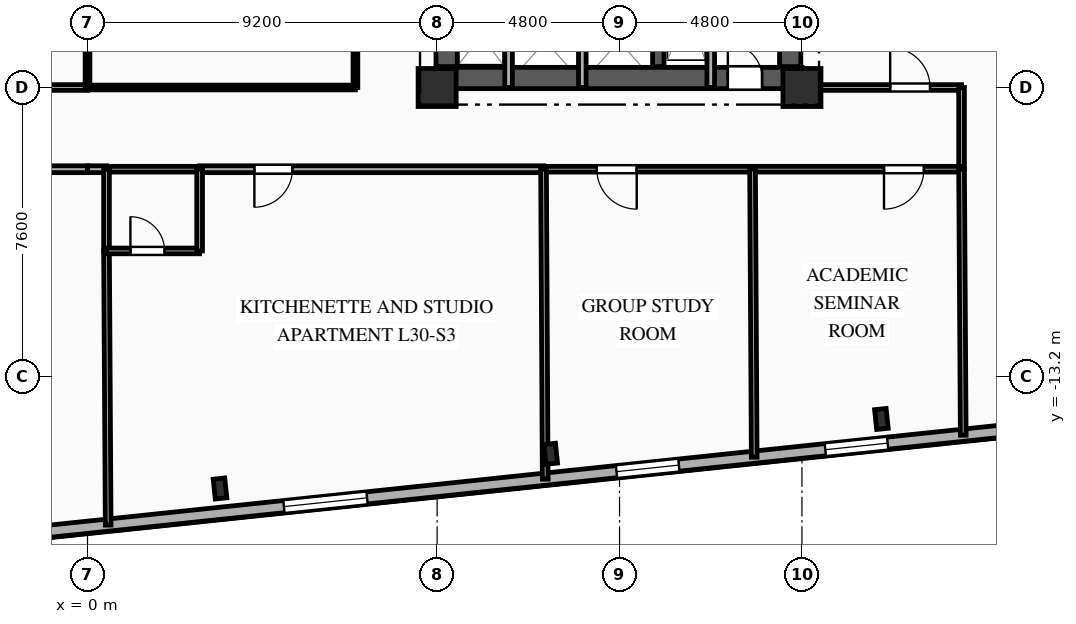
"""IFC4 building model, lengths in metres.
Left out: names, types, materials, properties, quantities, classifications, styles, units other than length and angle.
Written with IfcOpenShell. Run it as: python <this file> out.ifc"""

import sys

from ifc_helpers import new_model, si_unit, direction, frame, frame_2d, origin, origin_2d, place, context, subcontext, project, spatial, rectangle, i_section, extrude, element, fill, save


model = new_model("IFC4")
c1 = context("Model", 3, precision=1e-05, world=origin(), true_north=direction((0.0, 1.0)))
c2 = subcontext(c1, "Body", "Model", "MODEL_VIEW")
j1 = project(units=[si_unit("LENGTHUNIT", "METRE"), si_unit("PLANEANGLEUNIT", "RADIAN")], contexts=[c1])
p1 = place(None, origin())
s1 = spatial("IfcSite", under=j1, at=p1, CompositionType="ELEMENT")
p2 = place(p1, origin())
s2 = spatial("IfcBuilding", under=s1, at=p2, CompositionType="ELEMENT")
p3 = place(p2, frame((0.0, 0.0, 109.15)))
s3 = spatial("IfcBuildingStorey", under=s2, at=p3, CompositionType="ELEMENT", Elevation=109.15)
for number, where, z_axis, x_axis in (
    (1, (9.2, -5.6, 0.0), (0.0, 0.0, 1.0), (1.0, 0.0, 0.0)),
    (2, (18.8, -5.6, 0.0), (0.0, 0.0, 1.0), (1.0, 0.0, 0.0)),
):
    element("IfcColumn", number, at=place(p3, frame(where, z_axis=z_axis, x_axis=x_axis)), inside=s3, PredefinedType="COLUMN", context=c2, shape_type="SweptSolid", body=[
        extrude(rectangle(XDim=1.0, YDim=1.0, at=origin_2d()), origin(), (0.0, 0.0, 1.0), 3.35),
    ])
for number, where, z_axis, x_axis in (
    (3, (3.487, -16.151, 0.0), (0.0, 0.0, 1.0), (0.995, 0.105, 0.0)),
    (4, (12.189, -15.237, 0.0), (0.0, 0.0, 1.0), (0.995, 0.105, 0.0)),
    (5, (20.891, -14.322, 0.0), (0.0, 0.0, 1.0), (0.995, 0.105, 0.0)),
):
    element("IfcColumn", number, at=place(p3, frame(where, z_axis=z_axis, x_axis=x_axis)), inside=s3, PredefinedType="COLUMN", context=c2, shape_type="SweptSolid", body=[
        extrude(i_section(OverallWidth=0.306, OverallDepth=0.524, WebThickness=0.021, FlangeThickness=0.04, FilletRadius=0.027, at=origin_2d()), origin(), (0.0, 0.0, 1.0), 3.35),
    ])
p4 = place(p3, frame((30.307, -13.986, 0.0), z_axis=(0.0, 0.0, 1.0), x_axis=(-0.994521628355, -0.104531003701, 0.0)))
e6 = element("IfcWall", 6, at=p4, inside=s3, PredefinedType="SOLIDWALL", context=c2, shape_type="SweptSolid", body=[
    extrude(rectangle(XDim=53.8, YDim=0.32, at=frame_2d((26.9, 0.0))), origin(), (0.0, 0.0, 1.0), 3.045),
])
p5 = place(p4, frame((3.098, 0.0, 0.85)))
e7 = element("IfcOpeningElement", 7, at=p5, cuts=e6, PredefinedType="OPENING", context=c2, shape_type="SweptSolid", body=[
    extrude(rectangle(XDim=1.65, YDim=1.85, at=frame_2d((0.825, 0.925))), frame((0.0, 0.17, 0.0), z_axis=(0.0, -1.0, 0.0), x_axis=(1.0, 0.0, 0.0)), (0.0, 0.0, 1.0), 0.34),
])
p6 = place(p4, frame((9.302, 0.0, 0.85)))
e8 = element("IfcOpeningElement", 8, at=p6, cuts=e6, PredefinedType="OPENING", context=c2, shape_type="SweptSolid", body=[
    extrude(rectangle(XDim=1.65, YDim=1.85, at=frame_2d((0.825, 0.925))), frame((0.0, 0.17, 0.0), z_axis=(0.0, -1.0, 0.0), x_axis=(1.0, 0.0, 0.0)), (0.0, 0.0, 1.0), 0.34),
])
p7 = place(p4, frame((14.827, 0.0, 0.85)))
e9 = element("IfcOpeningElement", 9, at=p7, cuts=e6, PredefinedType="OPENING", context=c2, shape_type="SweptSolid", body=[
    extrude(rectangle(XDim=1.65, YDim=1.85, at=frame_2d((0.825, 0.925))), frame((0.0, 0.17, 0.0), z_axis=(0.0, -1.0, 0.0), x_axis=(1.0, 0.0, 0.0)), (0.0, 0.0, 1.0), 0.34),
])
p8 = place(p4, frame((23.078, 0.0, 0.85)))
e10 = element("IfcOpeningElement", 10, at=p8, cuts=e6, PredefinedType="OPENING", context=c2, shape_type="SweptSolid", body=[
    extrude(rectangle(XDim=2.2, YDim=1.85, at=frame_2d((1.1, 0.925))), frame((0.0, 0.17, 0.0), z_axis=(0.0, -1.0, 0.0), x_axis=(1.0, 0.0, 0.0)), (0.0, 0.0, 1.0), 0.34),
])
p9 = place(p4, frame((34.646, 0.0, 0.85)))
e11 = element("IfcOpeningElement", 11, at=p9, cuts=e6, PredefinedType="OPENING", context=c2, shape_type="SweptSolid", body=[
    extrude(rectangle(XDim=2.2, YDim=1.85, at=frame_2d((1.1, 0.925))), frame((0.0, 0.17, 0.0), z_axis=(0.0, -1.0, 0.0), x_axis=(1.0, 0.0, 0.0)), (0.0, 0.0, 1.0), 0.34),
])
p10 = place(p4, frame((43.728, 0.0, 0.85)))
e12 = element("IfcOpeningElement", 12, at=p10, cuts=e6, PredefinedType="OPENING", context=c2, shape_type="SweptSolid", body=[
    extrude(rectangle(XDim=1.65, YDim=1.85, at=frame_2d((0.825, 0.925))), frame((0.0, 0.17, 0.0), z_axis=(0.0, -1.0, 0.0), x_axis=(1.0, 0.0, 0.0)), (0.0, 0.0, 1.0), 0.34),
])
p11 = place(p4, frame((49.653, 0.0, 0.85)))
e13 = element("IfcOpeningElement", 13, at=p11, cuts=e6, PredefinedType="OPENING", context=c2, shape_type="SweptSolid", body=[
    extrude(rectangle(XDim=1.65, YDim=1.85, at=frame_2d((0.825, 0.925))), frame((0.0, 0.17, 0.0), z_axis=(0.0, -1.0, 0.0), x_axis=(1.0, 0.0, 0.0)), (0.0, 0.0, 1.0), 0.34),
])
p12 = place(p3, frame((9.2, -5.35, 0.0), z_axis=(0.0, 0.0, 1.0), x_axis=(1.0, 0.0, 0.0)))
e14 = element("IfcWall", 14, at=p12, inside=s3, PredefinedType="SHEAR", context=c2, shape_type="SweptSolid", body=[
    extrude(rectangle(XDim=9.6, YDim=0.56, at=frame_2d((4.8, 0.0))), origin(), (0.0, 0.0, 1.0), 3.045),
])
p13 = place(p12, frame((7.65, 0.0, 0.0)))
e15 = element("IfcOpeningElement", 15, at=p13, cuts=e14, PredefinedType="OPENING", context=c2, shape_type="SweptSolid", body=[
    extrude(rectangle(XDim=0.9, YDim=2.1, at=frame_2d((0.45, 1.05))), frame((0.0, 0.29, 0.0), z_axis=(0.0, -1.0, 0.0), x_axis=(1.0, 0.0, 0.0)), (0.0, 0.0, 1.0), 0.58),
])
p14 = place(p3, frame((9.45, -5.05, 0.0), z_axis=(0.0, 0.0, 1.0), x_axis=(0.0, 1.0, 0.0)))
e16 = element("IfcWall", 16, at=p14, inside=s3, PredefinedType="SHEAR", context=c2, shape_type="SweptSolid", body=[
    extrude(rectangle(XDim=10.1, YDim=0.56, at=frame_2d((5.05, 0.0))), origin(), (0.0, 0.0, 1.0), 3.045),
])
p15 = place(p14, frame((7.15, 0.0, 0.0)))
e17 = element("IfcOpeningElement", 17, at=p15, cuts=e16, PredefinedType="OPENING", context=c2, shape_type="SweptSolid", body=[
    extrude(rectangle(XDim=0.9, YDim=2.1, at=frame_2d((0.45, 1.05))), frame((0.0, 0.29, 0.0), z_axis=(0.0, -1.0, 0.0), x_axis=(1.0, 0.0, 0.0)), (0.0, 0.0, 1.0), 0.58),
])
p16 = place(p14, frame((2.4, 0.0, 0.0)))
e18 = element("IfcOpeningElement", 18, at=p16, cuts=e16, PredefinedType="OPENING", context=c2, shape_type="SweptSolid", body=[
    extrude(rectangle(XDim=1.2, YDim=2.15, at=frame_2d((0.6, 1.075))), frame((0.0, 0.29, 0.0), z_axis=(0.0, -1.0, 0.0), x_axis=(1.0, 0.0, 0.0)), (0.0, 0.0, 1.0), 0.58),
])
p17 = place(p3, frame((18.49, -5.05, 0.0), z_axis=(0.0, 0.0, 1.0), x_axis=(0.0, 1.0, 0.0)))
e19 = element("IfcWall", 19, at=p17, inside=s3, PredefinedType="SHEAR", context=c2, shape_type="SweptSolid", body=[
    extrude(rectangle(XDim=10.1, YDim=0.56, at=frame_2d((5.05, 0.0))), origin(), (0.0, 0.0, 1.0), 3.045),
])
p18 = place(p3, frame((15.02, -5.05, 0.0), z_axis=(0.0, 0.0, 1.0), x_axis=(0.0, 1.0, 0.0)))
e20 = element("IfcWall", 20, at=p18, inside=s3, PredefinedType="SHEAR", context=c2, shape_type="SweptSolid", body=[
    extrude(rectangle(XDim=10.1, YDim=0.3, at=frame_2d((5.05, 0.0))), origin(), (0.0, 0.0, 1.0), 3.045),
])
p19 = place(p3, frame((16.4, -2.11, 0.0), z_axis=(0.0, 0.0, 1.0), x_axis=(0.0, -1.0, 0.0)))
e21 = element("IfcWall", 21, at=p19, inside=s3, PredefinedType="PARTITIONING", context=c2, shape_type="SweptSolid", body=[
    extrude(rectangle(XDim=3.49, YDim=0.2, at=frame_2d((1.745, 0.0))), origin(), (0.0, 0.0, 1.0), 3.045),
])
for number, where, z_axis, x_axis in (
    (22, (11.08, -5.6, 0.0), (0.0, 0.0, 1.0), (0.0, 1.0, 0.0)),
    (23, (13.02, -5.6, 0.0), (0.0, 0.0, 1.0), (0.0, 1.0, 0.0)),
):
    element("IfcWall", number, at=place(p3, frame(where, z_axis=z_axis, x_axis=x_axis)), inside=s3, PredefinedType="PARTITIONING", context=c2, shape_type="SweptSolid", body=[
        extrude(rectangle(XDim=2.25, YDim=0.2, at=frame_2d((1.125, 0.0))), origin(), (0.0, 0.0, 1.0), 3.045),
    ])
p20 = place(p3, frame((0.0, -7.75, 0.0), z_axis=(0.0, 0.0, 1.0), x_axis=(-1.0, 0.0, 0.0)))
e24 = element("IfcWall", 24, at=p20, inside=s3, PredefinedType="PARTITIONING", context=c2, shape_type="SweptSolid", body=[
    extrude(rectangle(XDim=8.55, YDim=0.18, at=frame_2d((4.275, 0.0))), origin(), (0.0, 0.0, 1.0), 3.045),
])
p21 = place(p20, frame((1.379, 0.0, 0.0)))
e25 = element("IfcOpeningElement", 25, at=p21, cuts=e24, PredefinedType="OPENING", context=c2, shape_type="SweptSolid", body=[
    extrude(rectangle(XDim=1.0, YDim=2.15, at=frame_2d((0.5, 1.075))), frame((0.0, 0.1, 0.0), z_axis=(0.0, -1.0, 0.0), x_axis=(1.0, 0.0, 0.0)), (0.0, 0.0, 1.0), 0.2),
])
p22 = place(p3, frame((-7.05, -5.6, 0.0), z_axis=(0.0, 0.0, 1.0), x_axis=(1.0, 0.0, 0.0)))
e26 = element("IfcWall", 26, at=p22, inside=s3, PredefinedType="PARTITIONING", context=c2, shape_type="SweptSolid", body=[
    extrude(rectangle(XDim=7.05, YDim=0.15, at=frame_2d((3.525, 0.0))), origin(), (0.0, 0.0, 1.0), 2.53),
])
p23 = place(p3, frame((18.8, -5.6, 0.0), z_axis=(0.0, 0.0, 1.0), x_axis=(1.0, 0.0, 0.0)))
e27 = element("IfcWall", 27, at=p23, inside=s3, PredefinedType="PARTITIONING", context=c2, shape_type="SweptSolid", body=[
    extrude(rectangle(XDim=4.2, YDim=0.15, at=frame_2d((2.1, 0.0))), origin(), (0.0, 0.0, 1.0), 2.53),
])
p24 = place(p23, frame((2.321, 0.0, 0.0)))
e28 = element("IfcOpeningElement", 28, at=p24, cuts=e27, PredefinedType="OPENING", context=c2, shape_type="SweptSolid", body=[
    extrude(rectangle(XDim=1.05, YDim=2.15, at=frame_2d((0.525, 1.075))), frame((0.0, 0.085, 0.0), z_axis=(0.0, -1.0, 0.0), x_axis=(1.0, 0.0, 0.0)), (0.0, 0.0, 1.0), 0.17),
])
p25 = place(p3, frame((23.0, -5.6, 0.0), z_axis=(0.0, 0.0, 1.0), x_axis=(0.0, -1.0, 0.0)))
e29 = element("IfcWall", 29, at=p25, inside=s3, PredefinedType="PARTITIONING", context=c2, shape_type="SweptSolid", body=[
    extrude(rectangle(XDim=2.15, YDim=0.15, at=frame_2d((1.075, 0.0))), origin(), (0.0, 0.0, 1.0), 3.045),
])
p26 = place(p3, frame((0.5, -7.75, 0.0), z_axis=(0.0, 0.0, 1.0), x_axis=(-1.0, 0.0, 0.0)))
e30 = element("IfcWall", 30, at=p26, inside=s3, PredefinedType="PARTITIONING", context=c2, shape_type="SweptSolid", body=[
    extrude(rectangle(XDim=0.5, YDim=0.18, at=frame_2d((0.25, 0.0))), origin(), (0.0, 0.0, 1.0), 3.045),
])
p27 = place(p3, frame((12.0, -7.75, 0.0), z_axis=(0.0, 0.0, 1.0), x_axis=(-1.0, 0.0, 0.0)))
e31 = element("IfcWall", 31, at=p27, inside=s3, PredefinedType="PARTITIONING", context=c2, shape_type="SweptSolid", body=[
    extrude(rectangle(XDim=9.05, YDim=0.18, at=frame_2d((4.525, 0.0))), origin(), (0.0, 0.0, 1.0), 3.045),
])
p28 = place(p27, frame((6.609, 0.0, 0.0)))
e32 = element("IfcOpeningElement", 32, at=p28, cuts=e31, PredefinedType="OPENING", context=c2, shape_type="SweptSolid", body=[
    extrude(rectangle(XDim=1.0, YDim=2.15, at=frame_2d((0.5, 1.075))), frame((0.0, 0.1, 0.0), z_axis=(0.0, -1.0, 0.0), x_axis=(1.0, 0.0, 0.0)), (0.0, 0.0, 1.0), 0.2),
])
p29 = place(p3, frame((2.95, -7.75, 0.0), z_axis=(0.0, 0.0, 1.0), x_axis=(-1.0, 0.0, 0.0)))
e33 = element("IfcWall", 33, at=p29, inside=s3, PredefinedType="PLUMBINGWALL", context=c2, shape_type="SweptSolid", body=[
    extrude(rectangle(XDim=2.45, YDim=0.15, at=frame_2d((1.225, 0.0))), origin(), (0.0, 0.0, 1.0), 3.045),
])
p30 = place(p3, frame((17.5, -7.75, 0.0), z_axis=(0.0, 0.0, 1.0), x_axis=(-1.0, 0.0, 0.0)))
e34 = element("IfcWall", 34, at=p30, inside=s3, PredefinedType="PARTITIONING", context=c2, shape_type="SweptSolid", body=[
    extrude(rectangle(XDim=5.5, YDim=0.15, at=frame_2d((2.75, 0.0))), origin(), (0.0, 0.0, 1.0), 3.045),
])
p31 = place(p30, frame((3.048, 0.0, 0.0)))
e35 = element("IfcOpeningElement", 35, at=p31, cuts=e34, PredefinedType="OPENING", context=c2, shape_type="SweptSolid", body=[
    extrude(rectangle(XDim=1.05, YDim=2.15, at=frame_2d((0.525, 1.075))), frame((0.0, 0.085, 0.0), z_axis=(0.0, -1.0, 0.0), x_axis=(1.0, 0.0, 0.0)), (0.0, 0.0, 1.0), 0.17),
])
p32 = place(p3, frame((23.0, -7.75, 0.0), z_axis=(0.0, 0.0, 1.0), x_axis=(-1.0, 0.0, 0.0)))
e36 = element("IfcWall", 36, at=p32, inside=s3, PredefinedType="PARTITIONING", context=c2, shape_type="SweptSolid", body=[
    extrude(rectangle(XDim=5.5, YDim=0.15, at=frame_2d((2.75, 0.0))), origin(), (0.0, 0.0, 1.0), 3.045),
])
p33 = place(p32, frame((0.991, 0.0, 0.0)))
e37 = element("IfcOpeningElement", 37, at=p33, cuts=e36, PredefinedType="OPENING", context=c2, shape_type="SweptSolid", body=[
    extrude(rectangle(XDim=1.05, YDim=2.15, at=frame_2d((0.525, 1.075))), frame((0.0, 0.085, 0.0), z_axis=(0.0, -1.0, 0.0), x_axis=(1.0, 0.0, 0.0)), (0.0, 0.0, 1.0), 0.17),
])
p34 = place(p3, frame((0.0, -5.6, 0.0), z_axis=(0.0, 0.0, 1.0), x_axis=(1.0, 0.0, 0.0)))
e38 = element("IfcWall", 38, at=p34, inside=s3, PredefinedType="PARTITIONING", context=c2, shape_type="SweptSolid", body=[
    extrude(rectangle(XDim=7.05, YDim=0.125, at=frame_2d((3.525, 0.0))), origin(), (0.0, 0.0, 1.0), 2.53),
])
p35 = place(p3, frame((7.05, -5.6, 0.0), z_axis=(0.0, 0.0, 1.0), x_axis=(0.0, 1.0, 0.0)))
e39 = element("IfcWall", 39, at=p35, inside=s3, PredefinedType="PARTITIONING", context=c2, shape_type="SweptSolid", body=[
    extrude(rectangle(XDim=14.1, YDim=0.125, at=frame_2d((7.05, 0.0))), origin(), (0.0, 0.0, 1.0), 3.045),
])
p36 = place(p35, frame((5.076, 0.0, 0.0)))
e40 = element("IfcOpeningElement", 40, at=p36, cuts=e39, PredefinedType="OPENING", context=c2, shape_type="SweptSolid", body=[
    extrude(rectangle(XDim=0.95, YDim=2.1, at=frame_2d((0.475, 1.05))), frame((0.0, 0.073, 0.0), z_axis=(0.0, -1.0, 0.0), x_axis=(1.0, 0.0, 0.0)), (0.0, 0.0, 1.0), 0.145),
])
p37 = place(p3, frame((23.044, -14.749, 0.0), z_axis=(0.0, 0.0, 1.0), x_axis=(-0.006278653971, 0.999980289058, 0.0)))
e41 = element("IfcWall", 41, at=p37, inside=s3, PredefinedType="PARTITIONING", context=c2, shape_type="SweptSolid", body=[
    extrude(rectangle(XDim=6.999, YDim=0.15, at=frame_2d((3.5, 0.0))), origin(), (0.0, 0.0, 1.0), 3.045),
])
p38 = place(p3, frame((0.5, -9.9, 0.0), z_axis=(0.0, 0.0, 1.0), x_axis=(0.006091463685, -0.999981446863, 0.0)))
e42 = element("IfcWall", 42, at=p38, inside=s3, PredefinedType="PARTITIONING", context=c2, shape_type="SweptSolid", body=[
    extrude(rectangle(XDim=7.214, YDim=0.15, at=frame_2d((3.607, 0.0))), origin(), (0.0, 0.0, 1.0), 3.045),
])
p39 = place(p3, frame((0.5, -7.75, 0.0), z_axis=(0.0, 0.0, 1.0), x_axis=(0.0, -1.0, 0.0)))
e43 = element("IfcWall", 43, at=p39, inside=s3, PredefinedType="PLUMBINGWALL", context=c2, shape_type="SweptSolid", body=[
    extrude(rectangle(XDim=2.15, YDim=0.15, at=frame_2d((1.075, 0.0))), origin(), (0.0, 0.0, 1.0), 3.045),
])
p40 = place(p3, frame((0.5, -9.9, 0.0), z_axis=(0.0, 0.0, 1.0), x_axis=(1.0, 0.0, 0.0)))
e44 = element("IfcWall", 44, at=p40, inside=s3, PredefinedType="PLUMBINGWALL", context=c2, shape_type="SweptSolid", body=[
    extrude(rectangle(XDim=2.45, YDim=0.15, at=frame_2d((1.225, 0.0))), origin(), (0.0, 0.0, 1.0), 3.045),
])
p41 = place(p40, frame((0.629, 0.0, 0.0)))
e45 = element("IfcOpeningElement", 45, at=p41, cuts=e44, PredefinedType="OPENING", context=c2, shape_type="SweptSolid", body=[
    extrude(rectangle(XDim=0.9, YDim=2.1, at=frame_2d((0.45, 1.05))), frame((0.0, 0.085, 0.0), z_axis=(0.0, -1.0, 0.0), x_axis=(1.0, 0.0, 0.0)), (0.0, 0.0, 1.0), 0.17),
])
p42 = place(p3, frame((2.95, -9.9, 0.0), z_axis=(0.0, 0.0, 1.0), x_axis=(0.0, 1.0, 0.0)))
e46 = element("IfcWall", 46, at=p42, inside=s3, PredefinedType="PLUMBINGWALL", context=c2, shape_type="SweptSolid", body=[
    extrude(rectangle(XDim=2.15, YDim=0.15, at=frame_2d((1.075, 0.0))), origin(), (0.0, 0.0, 1.0), 3.045),
])
p43 = place(p3, frame((12.0, -7.75, 0.0), z_axis=(0.0, 0.0, 1.0), x_axis=(0.005388497987, -0.999985481939, 0.0)))
e47 = element("IfcWall", 47, at=p43, inside=s3, PredefinedType="PARTITIONING", context=c2, shape_type="SweptSolid", body=[
    extrude(rectangle(XDim=8.155, YDim=0.15, at=frame_2d((4.078, 0.0))), origin(), (0.0, 0.0, 1.0), 2.53),
])
p44 = place(p3, frame((17.5, -7.75, 0.0), z_axis=(0.0, 0.0, 1.0), x_axis=(0.005799618919, -0.999983182069, 0.0)))
e48 = element("IfcWall", 48, at=p44, inside=s3, PredefinedType="PARTITIONING", context=c2, shape_type="SweptSolid", body=[
    extrude(rectangle(XDim=7.577, YDim=0.15, at=frame_2d((3.789, 0.0))), origin(), (0.0, 0.0, 1.0), 3.045),
])
p45 = place(p3, frame((0.0, 8.5, 0.0), z_axis=(0.0, 0.0, 1.0), x_axis=(0.0, -1.0, 0.0)))
e49 = element("IfcWall", 49, at=p45, inside=s3, PredefinedType="PARTITIONING", context=c2, shape_type="SweptSolid", body=[
    extrude(rectangle(XDim=14.1, YDim=0.125, at=frame_2d((7.05, 0.0))), origin(), (0.0, 0.0, 1.0), 3.045),
])
p46 = place(p6, origin())
e50 = element("IfcWindow", 50, at=p46, inside=s3, PartitioningType="SINGLE_PANEL", PredefinedType="WINDOW", context=c2, shape_type="SweptSolid", body=[
    extrude(rectangle(XDim=1.65, YDim=1.85, at=frame_2d((0.825, 0.925))), frame((0.0, 0.03, 0.0), z_axis=(0.0, -1.0, 0.0), x_axis=(1.0, 0.0, 0.0)), (0.0, 0.0, 1.0), 0.06),
])
fill(e8, e50)
p47 = place(p7, origin())
e51 = element("IfcWindow", 51, at=p47, inside=s3, PartitioningType="SINGLE_PANEL", PredefinedType="WINDOW", context=c2, shape_type="SweptSolid", body=[
    extrude(rectangle(XDim=1.65, YDim=1.85, at=frame_2d((0.825, 0.925))), frame((0.0, 0.03, 0.0), z_axis=(0.0, -1.0, 0.0), x_axis=(1.0, 0.0, 0.0)), (0.0, 0.0, 1.0), 0.06),
])
fill(e9, e51)
p48 = place(p8, origin())
e52 = element("IfcWindow", 52, at=p48, inside=s3, PartitioningType="SINGLE_PANEL", PredefinedType="WINDOW", context=c2, shape_type="SweptSolid", body=[
    extrude(rectangle(XDim=2.2, YDim=1.85, at=frame_2d((1.1, 0.925))), frame((0.0, 0.03, 0.0), z_axis=(0.0, -1.0, 0.0), x_axis=(1.0, 0.0, 0.0)), (0.0, 0.0, 1.0), 0.06),
])
fill(e10, e52)
p49 = place(p13, origin())
e53 = element("IfcDoor", 53, at=p49, inside=s3, OperationType="SINGLE_SWING_LEFT", PredefinedType="DOOR", context=c2, shape_type="SweptSolid", body=[
    extrude(rectangle(XDim=0.9, YDim=2.1, at=frame_2d((0.45, 1.05))), frame((0.0, 0.025, 0.0), z_axis=(0.0, -1.0, 0.0), x_axis=(1.0, 0.0, 0.0)), (0.0, 0.0, 1.0), 0.05),
])
fill(e15, e53)
p50 = place(p24, origin())
e54 = element("IfcDoor", 54, at=p50, inside=s3, OperationType="SINGLE_SWING_LEFT", PredefinedType="DOOR", context=c2, shape_type="SweptSolid", body=[
    extrude(rectangle(XDim=1.05, YDim=2.15, at=frame_2d((0.525, 1.075))), frame((0.0, 0.025, 0.0), z_axis=(0.0, -1.0, 0.0), x_axis=(1.0, 0.0, 0.0)), (0.0, 0.0, 1.0), 0.05),
])
fill(e28, e54)
p51 = place(p28, origin())
e55 = element("IfcDoor", 55, at=p51, inside=s3, OperationType="SINGLE_SWING_RIGHT", PredefinedType="DOOR", context=c2, shape_type="SweptSolid", body=[
    extrude(rectangle(XDim=1.0, YDim=2.15, at=frame_2d((0.5, 1.075))), frame((0.0, 0.025, 0.0), z_axis=(0.0, -1.0, 0.0), x_axis=(1.0, 0.0, 0.0)), (0.0, 0.0, 1.0), 0.05),
])
fill(e32, e55)
p52 = place(p31, origin())
e56 = element("IfcDoor", 56, at=p52, inside=s3, OperationType="SINGLE_SWING_LEFT", PredefinedType="DOOR", context=c2, shape_type="SweptSolid", body=[
    extrude(rectangle(XDim=1.05, YDim=2.15, at=frame_2d((0.525, 1.075))), frame((0.0, 0.025, 0.0), z_axis=(0.0, -1.0, 0.0), x_axis=(1.0, 0.0, 0.0)), (0.0, 0.0, 1.0), 0.05),
])
fill(e35, e56)
p53 = place(p33, origin())
e57 = element("IfcDoor", 57, at=p53, inside=s3, OperationType="SINGLE_SWING_RIGHT", PredefinedType="DOOR", context=c2, shape_type="SweptSolid", body=[
    extrude(rectangle(XDim=1.05, YDim=2.15, at=frame_2d((0.525, 1.075))), frame((0.0, 0.025, 0.0), z_axis=(0.0, -1.0, 0.0), x_axis=(1.0, 0.0, 0.0)), (0.0, 0.0, 1.0), 0.05),
])
fill(e37, e57)
p54 = place(p41, origin())
e58 = element("IfcDoor", 58, at=p54, inside=s3, OperationType="SINGLE_SWING_LEFT", PredefinedType="DOOR", context=c2, shape_type="SweptSolid", body=[
    extrude(rectangle(XDim=0.9, YDim=2.1, at=frame_2d((0.45, 1.05))), frame((0.0, 0.025, 0.0), z_axis=(0.0, -1.0, 0.0), x_axis=(1.0, 0.0, 0.0)), (0.0, 0.0, 1.0), 0.05),
])
fill(e45, e58)
save(model, sys.argv[1])
